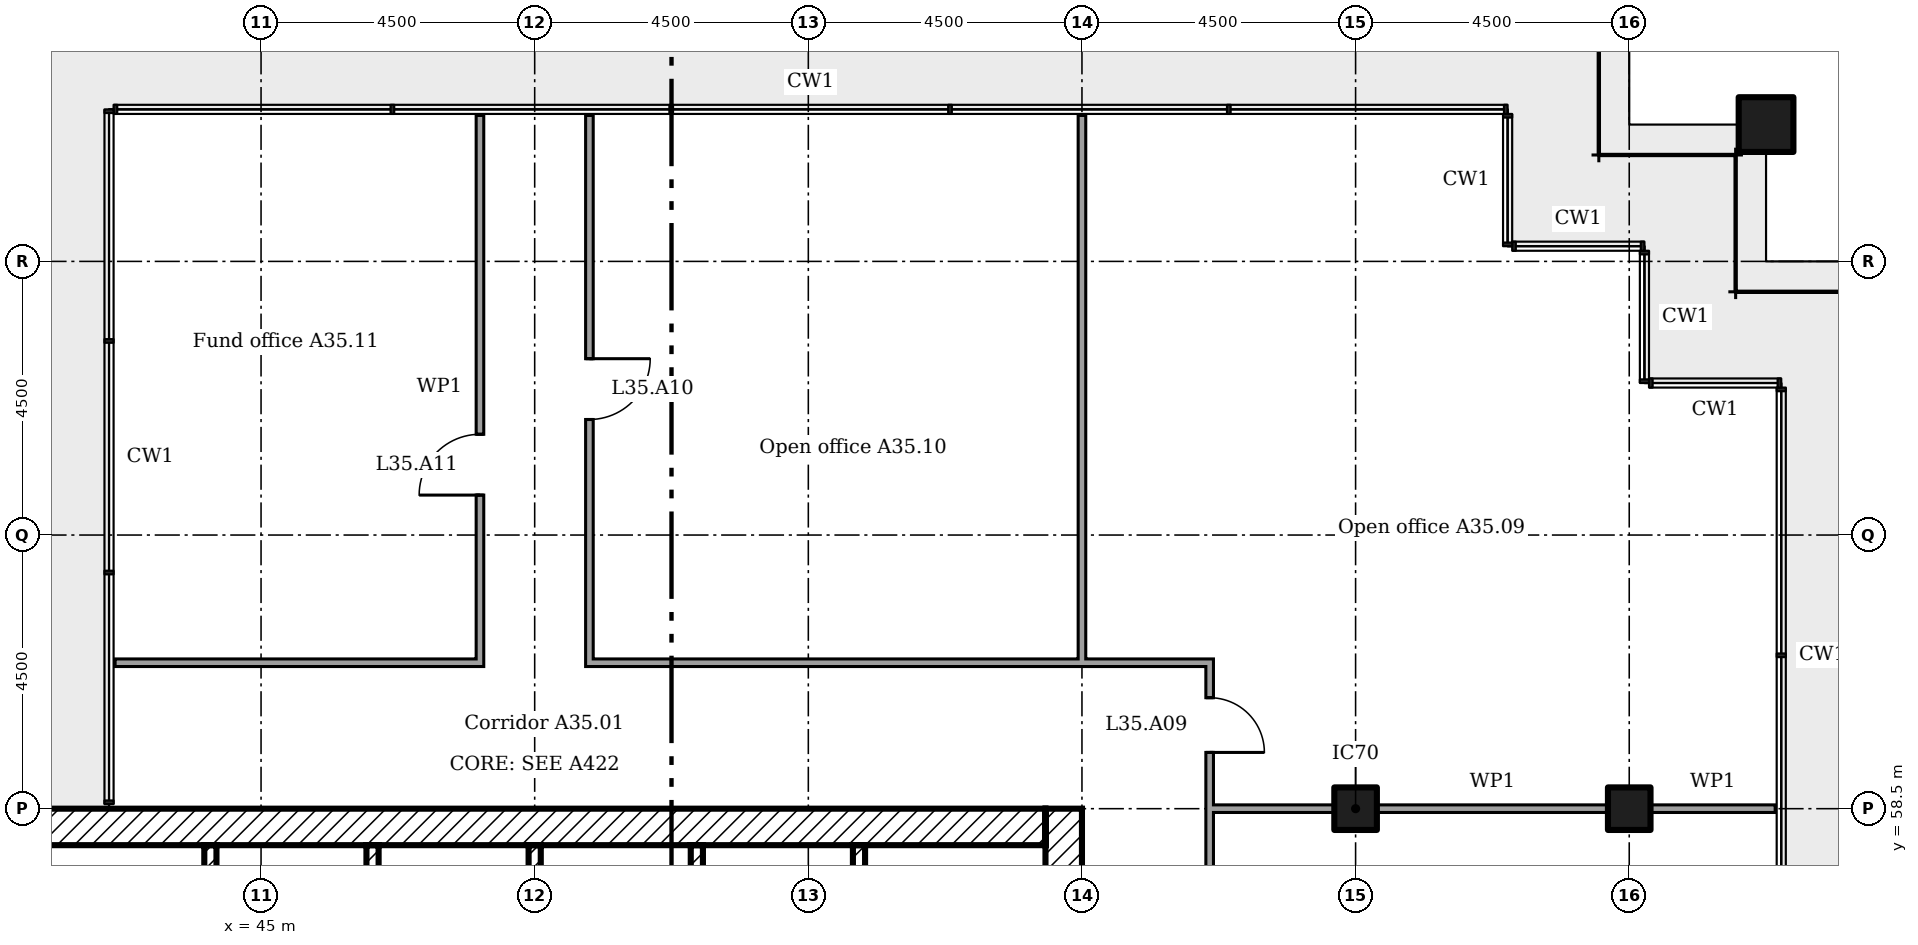
"""IFC4 building model, lengths in metres.
Left out: names, types, materials, properties, quantities, classifications, styles, units other than length and angle.
Written with IfcOpenShell. Run it as: python <this file> out.ifc"""

import sys

from ifc_helpers import new_model, si_unit, direction, frame, frame_2d, origin, origin_2d, place, context, subcontext, project, spatial, rectangle, extrude, element, fill, save


model = new_model("IFC4")
c1 = context("Model", 3, precision=1e-05, world=origin(), true_north=direction((0.0, 1.0)))
c2 = subcontext(c1, "Body", "Model", "MODEL_VIEW")
j1 = project(units=[si_unit("LENGTHUNIT", "METRE"), si_unit("PLANEANGLEUNIT", "RADIAN")], contexts=[c1])
p1 = place(None, origin())
s1 = spatial("IfcSite", under=j1, at=p1, CompositionType="ELEMENT")
p2 = place(p1, origin())
s2 = spatial("IfcBuilding", under=s1, at=p2, CompositionType="ELEMENT")
p3 = place(p2, frame((0.0, 0.0, 143.8)))
s3 = spatial("IfcBuildingStorey", under=s2, at=p3, CompositionType="ELEMENT", Elevation=143.8)
p4 = place(p3, frame((69.75, 69.75, 0.0)))
e1 = element("IfcColumn", 1, at=p4, inside=s3, PredefinedType="COLUMN", context=c2, shape_type="SweptSolid", body=[
    extrude(rectangle(XDim=0.9, YDim=0.9, at=origin_2d()), origin(), (0.0, 0.0, 1.0), 3.6),
])
for number, where in (
    (2, (63.0, 58.5, 0.0)),
    (3, (67.5, 58.5, 0.0)),
):
    element("IfcColumn", number, at=place(p3, frame(where)), inside=s3, PredefinedType="COLUMN", context=c2, shape_type="SweptSolid", body=[
        extrude(rectangle(XDim=0.7, YDim=0.7, at=origin_2d()), origin(), (0.0, 0.0, 1.0), 3.6),
    ])
p5 = place(p3, frame((58.2, 40.5, 0.0), z_axis=(0.0, 0.0, 1.0), x_axis=(0.0, 1.0, 0.0)))
e4 = element("IfcWall", 4, at=p5, inside=s3, PredefinedType="SHEAR", context=c2, shape_type="SweptSolid", body=[
    extrude(rectangle(XDim=18.0, YDim=0.6, at=frame_2d((9.0, 0.0))), origin(), (0.0, 0.0, 1.0), 3.35),
])
p6 = place(p5, frame((13.15, 0.0, 0.0)))
e5 = element("IfcOpeningElement", 5, at=p6, cuts=e4, PredefinedType="OPENING", context=c2, shape_type="SweptSolid", body=[
    extrude(rectangle(XDim=1.2, YDim=2.1, at=frame_2d((0.6, 1.05))), frame((0.0, 0.31, 0.0), z_axis=(0.0, -1.0, 0.0), x_axis=(1.0, 0.0, 0.0)), (0.0, 0.0, 1.0), 0.62),
])
p7 = place(p5, frame((3.9, 0.0, 0.0)))
e6 = element("IfcOpeningElement", 6, at=p7, cuts=e4, PredefinedType="OPENING", context=c2, shape_type="SweptSolid", body=[
    extrude(rectangle(XDim=1.8, YDim=2.1, at=frame_2d((0.9, 1.05))), frame((0.0, 0.31, 0.0), z_axis=(0.0, -1.0, 0.0), x_axis=(1.0, 0.0, 0.0)), (0.0, 0.0, 1.0), 0.62),
])
p8 = place(p5, frame((11.525, 0.0, 0.0)))
e7 = element("IfcOpeningElement", 7, at=p8, cuts=e4, PredefinedType="OPENING", context=c2, shape_type="SweptSolid", body=[
    extrude(rectangle(XDim=1.0, YDim=2.1, at=frame_2d((0.5, 1.05))), frame((0.0, 0.31, 0.0), z_axis=(0.0, -1.0, 0.0), x_axis=(1.0, 0.0, 0.0)), (0.0, 0.0, 1.0), 0.62),
])
p9 = place(p3, frame((40.5, 58.2, 0.0)))
e8 = element("IfcWall", 8, at=p9, inside=s3, PredefinedType="SHEAR", context=c2, shape_type="SweptSolid", body=[
    extrude(rectangle(XDim=17.4, YDim=0.6, at=frame_2d((8.7, 0.0))), origin(), (0.0, 0.0, 1.0), 3.35),
])
p10 = place(p3, frame((44.167, 57.9, 0.0), z_axis=(0.0, 0.0, 1.0), x_axis=(0.0, -1.0, 0.0)))
e9 = element("IfcWall", 9, at=p10, inside=s3, PredefinedType="SHEAR", context=c2, shape_type="SweptSolid", body=[
    extrude(rectangle(XDim=3.5, YDim=0.2, at=frame_2d((1.75, 0.0))), origin(), (0.0, 0.0, 1.0), 3.35),
])
p11 = place(p3, frame((46.833, 57.9, 0.0), z_axis=(0.0, 0.0, 1.0), x_axis=(0.0, -1.0, 0.0)))
e10 = element("IfcWall", 10, at=p11, inside=s3, PredefinedType="SHEAR", context=c2, shape_type="SweptSolid", body=[
    extrude(rectangle(XDim=4.6, YDim=0.2, at=frame_2d((2.3, 0.0))), origin(), (0.0, 0.0, 1.0), 3.35),
])
for number, where, z_axis, x_axis in (
    (11, (49.5, 57.9, 0.0), (0.0, 0.0, 1.0), (0.0, -1.0, 0.0)),
    (12, (52.167, 57.9, 0.0), (0.0, 0.0, 1.0), (0.0, -1.0, 0.0)),
    (13, (54.833, 57.9, 0.0), (0.0, 0.0, 1.0), (0.0, -1.0, 0.0)),
):
    element("IfcWall", number, at=place(p3, frame(where, z_axis=z_axis, x_axis=x_axis)), inside=s3, PredefinedType="SHEAR", context=c2, shape_type="SweptSolid", body=[
        extrude(rectangle(XDim=2.7, YDim=0.2, at=frame_2d((1.35, 0.0))), origin(), (0.0, 0.0, 1.0), 3.35),
    ])
p12 = place(p3, frame((60.6, 58.5, 0.0)))
e14 = element("IfcWall", 14, at=p12, inside=s3, PredefinedType="PARTITIONING", context=c2, shape_type="SweptSolid", body=[
    extrude(rectangle(XDim=2.05, YDim=0.125, at=frame_2d((1.025, 0.0))), origin(), (0.0, 0.0, 1.0), 2.676),
])
p13 = place(p3, frame((63.35, 58.5, 0.0)))
e15 = element("IfcWall", 15, at=p13, inside=s3, PredefinedType="PARTITIONING", context=c2, shape_type="SweptSolid", body=[
    extrude(rectangle(XDim=3.8, YDim=0.125, at=frame_2d((1.9, 0.0))), origin(), (0.0, 0.0, 1.0), 2.676),
])
p14 = place(p3, frame((67.85, 58.5, 0.0)))
e16 = element("IfcWall", 16, at=p14, inside=s3, PredefinedType="PARTITIONING", context=c2, shape_type="SweptSolid", body=[
    extrude(rectangle(XDim=2.05, YDim=0.125, at=frame_2d((1.025, 0.0))), origin(), (0.0, 0.0, 1.0), 2.676),
])
p15 = place(p3, frame((42.6, 60.9, 0.0)))
e17 = element("IfcWall", 17, at=p15, inside=s3, PredefinedType="PARTITIONING", context=c2, shape_type="SweptSolid", body=[
    extrude(rectangle(XDim=6.062, YDim=0.125, at=frame_2d((3.031, 0.0))), origin(), (0.0, 0.0, 1.0), 3.45),
])
p16 = place(p3, frame((50.337, 60.9, 0.0)))
e18 = element("IfcWall", 18, at=p16, inside=s3, PredefinedType="PARTITIONING", context=c2, shape_type="SweptSolid", body=[
    extrude(rectangle(XDim=10.325, YDim=0.125, at=frame_2d((5.163, 0.0))), origin(), (0.0, 0.0, 1.0), 3.45),
])
p17 = place(p3, frame((48.6, 60.962, 0.0), z_axis=(0.0, 0.0, 1.0), x_axis=(0.0, 1.0, 0.0)))
e19 = element("IfcWall", 19, at=p17, inside=s3, PredefinedType="PARTITIONING", context=c2, shape_type="SweptSolid", body=[
    extrude(rectangle(XDim=8.938, YDim=0.125, at=frame_2d((4.469, 0.0))), origin(), (0.0, 0.0, 1.0), 3.45),
])
p18 = place(p17, frame((2.695, 0.0, 0.0)))
e20 = element("IfcOpeningElement", 20, at=p18, cuts=e19, PredefinedType="OPENING", context=c2, shape_type="SweptSolid", body=[
    extrude(rectangle(XDim=1.0, YDim=2.1, at=frame_2d((0.5, 1.05))), frame((0.0, 0.073, 0.0), z_axis=(0.0, -1.0, 0.0), x_axis=(1.0, 0.0, 0.0)), (0.0, 0.0, 1.0), 0.145),
])
p19 = place(p3, frame((50.4, 60.962, 0.0), z_axis=(0.0, 0.0, 1.0), x_axis=(0.0, 1.0, 0.0)))
e21 = element("IfcWall", 21, at=p19, inside=s3, PredefinedType="PARTITIONING", context=c2, shape_type="SweptSolid", body=[
    extrude(rectangle(XDim=8.938, YDim=0.125, at=frame_2d((4.469, 0.0))), origin(), (0.0, 0.0, 1.0), 3.45),
])
p20 = place(p19, frame((3.938, 0.0, 0.0)))
e22 = element("IfcOpeningElement", 22, at=p20, cuts=e21, PredefinedType="OPENING", context=c2, shape_type="SweptSolid", body=[
    extrude(rectangle(XDim=1.0, YDim=2.1, at=frame_2d((0.5, 1.05))), frame((0.0, 0.073, 0.0), z_axis=(0.0, -1.0, 0.0), x_axis=(1.0, 0.0, 0.0)), (0.0, 0.0, 1.0), 0.145),
])
p21 = place(p3, frame((58.5, 60.9, 0.0), z_axis=(0.0, 0.0, 1.0), x_axis=(0.0, 1.0, 0.0)))
e23 = element("IfcWall", 23, at=p21, inside=s3, PredefinedType="PARTITIONING", context=c2, shape_type="SweptSolid", body=[
    extrude(rectangle(XDim=9.0, YDim=0.125, at=frame_2d((4.5, 0.0))), origin(), (0.0, 0.0, 1.0), 2.766),
])
p22 = place(p3, frame((60.6, 38.762, 0.0), z_axis=(0.0, 0.0, 1.0), x_axis=(0.0, 1.0, 0.0)))
e24 = element("IfcWall", 24, at=p22, inside=s3, PredefinedType="PARTITIONING", context=c2, shape_type="SweptSolid", body=[
    extrude(rectangle(XDim=22.075, YDim=0.125, at=frame_2d((11.038, 0.0))), origin(), (0.0, 0.0, 1.0), 3.45),
])
p23 = place(p22, frame((3.032, 0.0, 0.0)))
e25 = element("IfcOpeningElement", 25, at=p23, cuts=e24, PredefinedType="OPENING", context=c2, shape_type="SweptSolid", body=[
    extrude(rectangle(XDim=1.0, YDim=2.1, at=frame_2d((0.5, 1.05))), frame((0.0, 0.073, 0.0), z_axis=(0.0, -1.0, 0.0), x_axis=(1.0, 0.0, 0.0)), (0.0, 0.0, 1.0), 0.145),
])
p24 = place(p22, frame((8.442, 0.0, 0.0)))
e26 = element("IfcOpeningElement", 26, at=p24, cuts=e24, PredefinedType="OPENING", context=c2, shape_type="SweptSolid", body=[
    extrude(rectangle(XDim=1.0, YDim=2.1, at=frame_2d((0.5, 1.05))), frame((0.0, 0.073, 0.0), z_axis=(0.0, -1.0, 0.0), x_axis=(1.0, 0.0, 0.0)), (0.0, 0.0, 1.0), 0.145),
])
p25 = place(p22, frame((12.488, 0.0, 0.0)))
e27 = element("IfcOpeningElement", 27, at=p25, cuts=e24, PredefinedType="OPENING", context=c2, shape_type="SweptSolid", body=[
    extrude(rectangle(XDim=1.0, YDim=2.1, at=frame_2d((0.5, 1.05))), frame((0.0, 0.073, 0.0), z_axis=(0.0, -1.0, 0.0), x_axis=(1.0, 0.0, 0.0)), (0.0, 0.0, 1.0), 0.145),
])
p26 = place(p22, frame((16.532, 0.0, 0.0)))
e28 = element("IfcOpeningElement", 28, at=p26, cuts=e24, PredefinedType="OPENING", context=c2, shape_type="SweptSolid", body=[
    extrude(rectangle(XDim=1.0, YDim=2.1, at=frame_2d((0.5, 1.05))), frame((0.0, 0.073, 0.0), z_axis=(0.0, -1.0, 0.0), x_axis=(1.0, 0.0, 0.0)), (0.0, 0.0, 1.0), 0.145),
])
p27 = place(p22, frame((20.663, 0.0, 0.0)))
e29 = element("IfcOpeningElement", 29, at=p27, cuts=e24, PredefinedType="OPENING", context=c2, shape_type="SweptSolid", body=[
    extrude(rectangle(XDim=0.9, YDim=2.1, at=frame_2d((0.45, 1.05))), frame((0.0, 0.073, 0.0), z_axis=(0.0, -1.0, 0.0), x_axis=(1.0, 0.0, 0.0)), (0.0, 0.0, 1.0), 0.145),
])
p28 = place(p27, frame((0.9, 0.0, 0.0), x_axis=(-1.0, 0.0, 0.0)))
e30 = element("IfcDoor", 30, at=p28, inside=s3, OperationType="SINGLE_SWING_LEFT", PredefinedType="DOOR", context=c2, shape_type="SweptSolid", body=[
    extrude(rectangle(XDim=0.9, YDim=2.1, at=frame_2d((0.45, 1.05))), frame((0.0, 0.025, 0.0), z_axis=(0.0, -1.0, 0.0), x_axis=(1.0, 0.0, 0.0)), (0.0, 0.0, 1.0), 0.05),
])
fill(e29, e30)
p29 = place(p20, frame((1.0, 0.0, 0.0), x_axis=(-1.0, 0.0, 0.0)))
e31 = element("IfcDoor", 31, at=p29, inside=s3, OperationType="SINGLE_SWING_RIGHT", PredefinedType="DOOR", context=c2, shape_type="SweptSolid", body=[
    extrude(rectangle(XDim=1.0, YDim=2.1, at=frame_2d((0.5, 1.05))), frame((0.0, 0.025, 0.0), z_axis=(0.0, -1.0, 0.0), x_axis=(1.0, 0.0, 0.0)), (0.0, 0.0, 1.0), 0.05),
])
fill(e22, e31)
p30 = place(p18, origin())
e32 = element("IfcDoor", 32, at=p30, inside=s3, OperationType="SINGLE_SWING_RIGHT", PredefinedType="DOOR", context=c2, shape_type="SweptSolid", body=[
    extrude(rectangle(XDim=1.0, YDim=2.1, at=frame_2d((0.5, 1.05))), frame((0.0, 0.025, 0.0), z_axis=(0.0, -1.0, 0.0), x_axis=(1.0, 0.0, 0.0)), (0.0, 0.0, 1.0), 0.05),
])
fill(e20, e32)
save(model, sys.argv[1])
